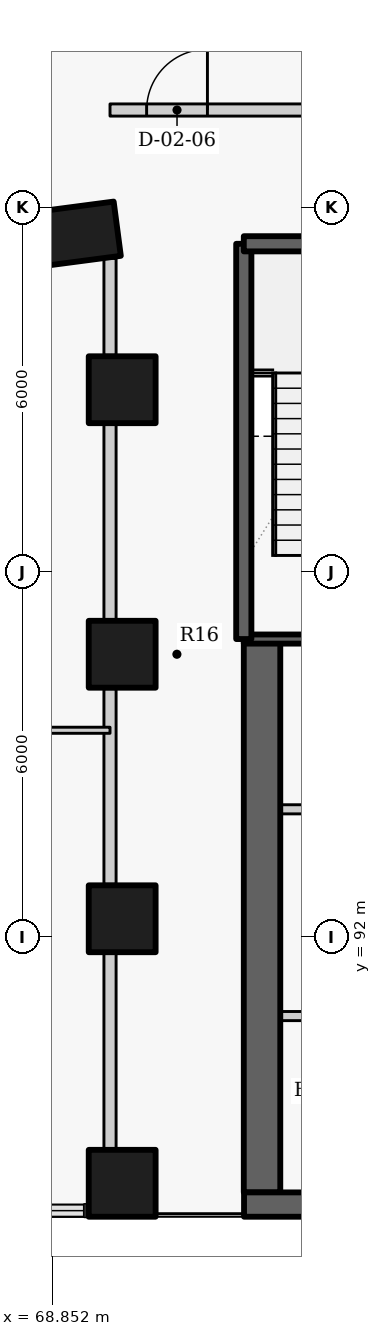
"""IFC4 building model, lengths in metres.
Left out: names, types, materials, properties, quantities, classifications, styles, units other than length and angle.
Written with IfcOpenShell. Run it as: python <this file> out.ifc"""

import sys

from ifc_helpers import new_model, si_unit, direction, frame, frame_2d, origin, origin_2d, place, context, subcontext, project, spatial, rectangle, extrude, element, fill, save


model = new_model("IFC4")
c1 = context("Model", 3, precision=1e-05, world=origin(), true_north=direction((0.0, 1.0)))
c2 = subcontext(c1, "Body", "Model", "MODEL_VIEW")
j1 = project(units=[si_unit("LENGTHUNIT", "METRE"), si_unit("PLANEANGLEUNIT", "RADIAN")], contexts=[c1])
p1 = place(None, origin())
s1 = spatial("IfcSite", under=j1, at=p1, CompositionType="ELEMENT")
p2 = place(p1, origin())
s2 = spatial("IfcBuilding", under=s1, at=p2, CompositionType="ELEMENT")
p3 = place(p2, frame((0.0, 0.0, 6.6)))
s3 = spatial("IfcBuildingStorey", under=s2, at=p3, CompositionType="ELEMENT", Elevation=6.6)
p4 = place(p3, frame((69.175, 103.55, 0.0), z_axis=(0.0, 0.0, 1.0), x_axis=(-0.991442583111, -0.130543496177, 0.0)))
e1 = element("IfcColumn", 1, at=p4, inside=s3, PredefinedType="COLUMN", context=c2, shape_type="SweptSolid", body=[
    extrude(rectangle(XDim=1.5, YDim=0.9, at=origin_2d()), origin(), (0.0, 0.0, 1.0), 4.8),
])
for number, where, z_axis, x_axis in (
    (2, (70.0, 101.0, 0.0), (0.0, 0.0, 1.0), (0.0, -1.0, 0.0)),
    (3, (70.0, 96.65, 0.0), (0.0, 0.0, 1.0), (0.0, -1.0, 0.0)),
    (4, (70.0, 92.3, 0.0), (0.0, 0.0, 1.0), (0.0, -1.0, 0.0)),
    (5, (70.0, 87.95, 0.0), (0.0, 0.0, 1.0), (0.0, -1.0, 0.0)),
):
    element("IfcColumn", number, at=place(p3, frame(where, z_axis=z_axis, x_axis=x_axis)), inside=s3, PredefinedType="COLUMN", context=c2, shape_type="SweptSolid", body=[
        extrude(rectangle(XDim=1.1, YDim=1.1, at=origin_2d()), origin(), (0.0, 0.0, 1.0), 4.8),
    ])
p5 = place(p3, frame((74.6, 90.7, 0.0), z_axis=(0.0, 0.0, 1.0), x_axis=(-1.0, 0.0, 0.0)))
e6 = element("IfcWall", 6, at=p5, inside=s3, PredefinedType="PARTITIONING", context=c2, shape_type="SweptSolid", body=[
    extrude(rectangle(XDim=2.6, YDim=0.15, at=frame_2d((1.3, 0.0))), origin(), (0.0, 0.0, 1.0), 4.5),
])
p6 = place(p5, frame((0.525, 0.0, 0.0)))
e7 = element("IfcOpeningElement", 7, at=p6, cuts=e6, PredefinedType="OPENING", context=c2, shape_type="SweptSolid", body=[
    extrude(rectangle(XDim=0.9, YDim=2.1, at=frame_2d((0.45, 1.05))), frame((0.0, 0.085, 0.0), z_axis=(0.0, -1.0, 0.0), x_axis=(1.0, 0.0, 0.0)), (0.0, 0.0, 1.0), 0.17),
])
p7 = place(p3, frame((72.3, 87.8, -0.3), z_axis=(0.0, 0.0, 1.0), x_axis=(0.0, 1.0, 0.0)))
e8 = element("IfcWall", 8, at=p7, inside=s3, PredefinedType="SHEAR", context=c2, shape_type="SweptSolid", body=[
    extrude(rectangle(XDim=9.1, YDim=0.6, at=frame_2d((4.55, 0.0))), origin(), (0.0, 0.0, 1.0), 4.8),
])
p8 = place(p3, frame((72.0, 94.1, 0.0), z_axis=(0.0, 0.0, 1.0), x_axis=(1.0, 0.0, 0.0)))
e9 = element("IfcWall", 9, at=p8, inside=s3, PredefinedType="PARTITIONING", context=c2, shape_type="SweptSolid", body=[
    extrude(rectangle(XDim=2.603, YDim=0.15, at=frame_2d((1.302, 0.0))), origin(), (0.0, 0.0, 1.0), 4.5),
])
p9 = place(p8, frame((1.075, 0.0, 0.0)))
e10 = element("IfcOpeningElement", 10, at=p9, cuts=e9, PredefinedType="OPENING", context=c2, shape_type="SweptSolid", body=[
    extrude(rectangle(XDim=1.1, YDim=2.1, at=frame_2d((0.55, 1.05))), frame((0.0, 0.085, 0.0), z_axis=(0.0, -1.0, 0.0), x_axis=(1.0, 0.0, 0.0)), (0.0, 0.0, 1.0), 0.17),
])
p10 = place(p3, frame((74.6, 96.9, -0.3), z_axis=(0.0, 0.0, 1.0), x_axis=(-1.0, 0.0, 0.0)))
e11 = element("IfcWall", 11, at=p10, inside=s3, PredefinedType="SHEAR", context=c2, shape_type="SweptSolid", body=[
    extrude(rectangle(XDim=2.6, YDim=0.15, at=frame_2d((1.3, 0.0))), origin(), (0.0, 0.0, 1.0), 4.8),
])
p11 = place(p10, frame((0.37, 0.0, 0.3)))
e12 = element("IfcOpeningElement", 12, at=p11, cuts=e11, PredefinedType="OPENING", context=c2, shape_type="SweptSolid", body=[
    extrude(rectangle(XDim=1.1, YDim=2.1, at=frame_2d((0.55, 1.05))), frame((0.0, 0.085, 0.0), z_axis=(0.0, -1.0, 0.0), x_axis=(1.0, 0.0, 0.0)), (0.0, 0.0, 1.0), 0.17),
])
p12 = place(p3, frame((72.0, 96.9, -0.3), z_axis=(0.0, 0.0, 1.0), x_axis=(0.0, 1.0, 0.0)))
e13 = element("IfcWall", 13, at=p12, inside=s3, PredefinedType="SHEAR", context=c2, shape_type="SweptSolid", body=[
    extrude(rectangle(XDim=6.5, YDim=0.25, at=frame_2d((3.25, 0.0))), origin(), (0.0, 0.0, 1.0), 4.8),
])
p13 = place(p3, frame((72.0, 103.4, -0.3), z_axis=(0.0, 0.0, 1.0), x_axis=(1.0, 0.0, 0.0)))
e14 = element("IfcWall", 14, at=p13, inside=s3, PredefinedType="SHEAR", context=c2, shape_type="SweptSolid", body=[
    extrude(rectangle(XDim=3.35, YDim=0.25, at=frame_2d((1.675, 0.0))), origin(), (0.0, 0.0, 1.0), 4.8),
])
p14 = place(p3, frame((69.8, 105.6, 0.0), z_axis=(0.0, 0.0, 1.0), x_axis=(1.0, 0.0, 0.0)))
e15 = element("IfcWall", 15, at=p14, inside=s3, PredefinedType="PARTITIONING", context=c2, shape_type="SweptSolid", body=[
    extrude(rectangle(XDim=20.4, YDim=0.2, at=frame_2d((10.2, 0.0))), origin(), (0.0, 0.0, 1.0), 4.5),
])
p15 = place(p14, frame((0.602, 0.0, 0.0)))
e16 = element("IfcOpeningElement", 16, at=p15, cuts=e15, PredefinedType="OPENING", context=c2, shape_type="SweptSolid", body=[
    extrude(rectangle(XDim=1.0, YDim=2.1, at=frame_2d((0.5, 1.05))), frame((0.0, 0.11, 0.0), z_axis=(0.0, -1.0, 0.0), x_axis=(1.0, 0.0, 0.0)), (0.0, 0.0, 1.0), 0.22),
])
p16 = place(p14, frame((18.8, 0.0, 0.0)))
e17 = element("IfcOpeningElement", 17, at=p16, cuts=e15, PredefinedType="OPENING", context=c2, shape_type="SweptSolid", body=[
    extrude(rectangle(XDim=1.0, YDim=2.1, at=frame_2d((0.5, 1.05))), frame((0.0, 0.11, 0.0), z_axis=(0.0, -1.0, 0.0), x_axis=(1.0, 0.0, 0.0)), (0.0, 0.0, 1.0), 0.22),
])
p17 = place(p14, frame((10.3, 0.0, 0.0)))
e18 = element("IfcOpeningElement", 18, at=p17, cuts=e15, PredefinedType="OPENING", context=c2, shape_type="SweptSolid", body=[
    extrude(rectangle(XDim=1.0, YDim=2.1, at=frame_2d((0.5, 1.05))), frame((0.0, 0.11, 0.0), z_axis=(0.0, -1.0, 0.0), x_axis=(1.0, 0.0, 0.0)), (0.0, 0.0, 1.0), 0.22),
])
p18 = place(p3, frame((69.8, 88.517, 0.0), z_axis=(0.0, 0.0, 1.0), x_axis=(0.0, 1.0, 0.0)))
e19 = element("IfcWall", 19, at=p18, inside=s3, PredefinedType="PARTITIONING", context=c2, shape_type="SweptSolid", body=[
    extrude(rectangle(XDim=3.216, YDim=0.2, at=frame_2d((1.608, 0.0))), origin(), (0.0, 0.0, 1.0), 3.73),
])
for number, where, z_axis, x_axis in (
    (20, (69.8, 92.867, 0.0), (0.0, 0.0, 1.0), (0.0, 1.0, 0.0)),
    (21, (69.8, 97.217, 0.0), (0.0, 0.0, 1.0), (0.0, 1.0, 0.0)),
):
    element("IfcWall", number, at=place(p3, frame(where, z_axis=z_axis, x_axis=x_axis)), inside=s3, PredefinedType="PARTITIONING", context=c2, shape_type="SweptSolid", body=[
        extrude(rectangle(XDim=3.216, YDim=0.2, at=frame_2d((1.608, 0.0))), origin(), (0.0, 0.0, 1.0), 3.73),
    ])
p19 = place(p3, frame((69.8, 101.567, 0.0), z_axis=(0.0, 0.0, 1.0), x_axis=(0.0, 1.0, 0.0)))
e22 = element("IfcWall", 22, at=p19, inside=s3, PredefinedType="PARTITIONING", context=c2, shape_type="SweptSolid", body=[
    extrude(rectangle(XDim=1.594, YDim=0.2, at=frame_2d((0.797, 0.0))), origin(), (0.0, 0.0, 1.0), 4.5),
])
p20 = place(p3, frame((62.434, 95.4, 0.0), z_axis=(0.0, 0.0, 1.0), x_axis=(1.0, 0.0, 0.0)))
e23 = element("IfcWall", 23, at=p20, inside=s3, PredefinedType="PARTITIONING", context=c2, shape_type="SweptSolid", body=[
    extrude(rectangle(XDim=7.366, YDim=0.1, at=frame_2d((3.683, 0.0))), origin(), (0.0, 0.0, 1.0), 4.5),
])
p21 = place(p3, frame((72.004, 87.6, -0.3), z_axis=(0.0, 0.0, 1.0), x_axis=(1.0, 0.0, 0.0)))
e24 = element("IfcWall", 24, at=p21, inside=s3, PredefinedType="SHEAR", context=c2, shape_type="SweptSolid", body=[
    extrude(rectangle(XDim=15.992, YDim=0.4, at=frame_2d((7.996, 0.0))), origin(), (0.0, 0.0, 1.0), 4.8),
])
p22 = place(p15, origin())
e25 = element("IfcDoor", 25, at=p22, inside=s3, OperationType="SINGLE_SWING_RIGHT", PredefinedType="DOOR", context=c2, shape_type="SweptSolid", body=[
    extrude(rectangle(XDim=1.0, YDim=2.1, at=frame_2d((0.5, 1.05))), frame((0.0, 0.025, 0.0), z_axis=(0.0, -1.0, 0.0), x_axis=(1.0, 0.0, 0.0)), (0.0, 0.0, 1.0), 0.05),
])
fill(e16, e25)
save(model, sys.argv[1])
